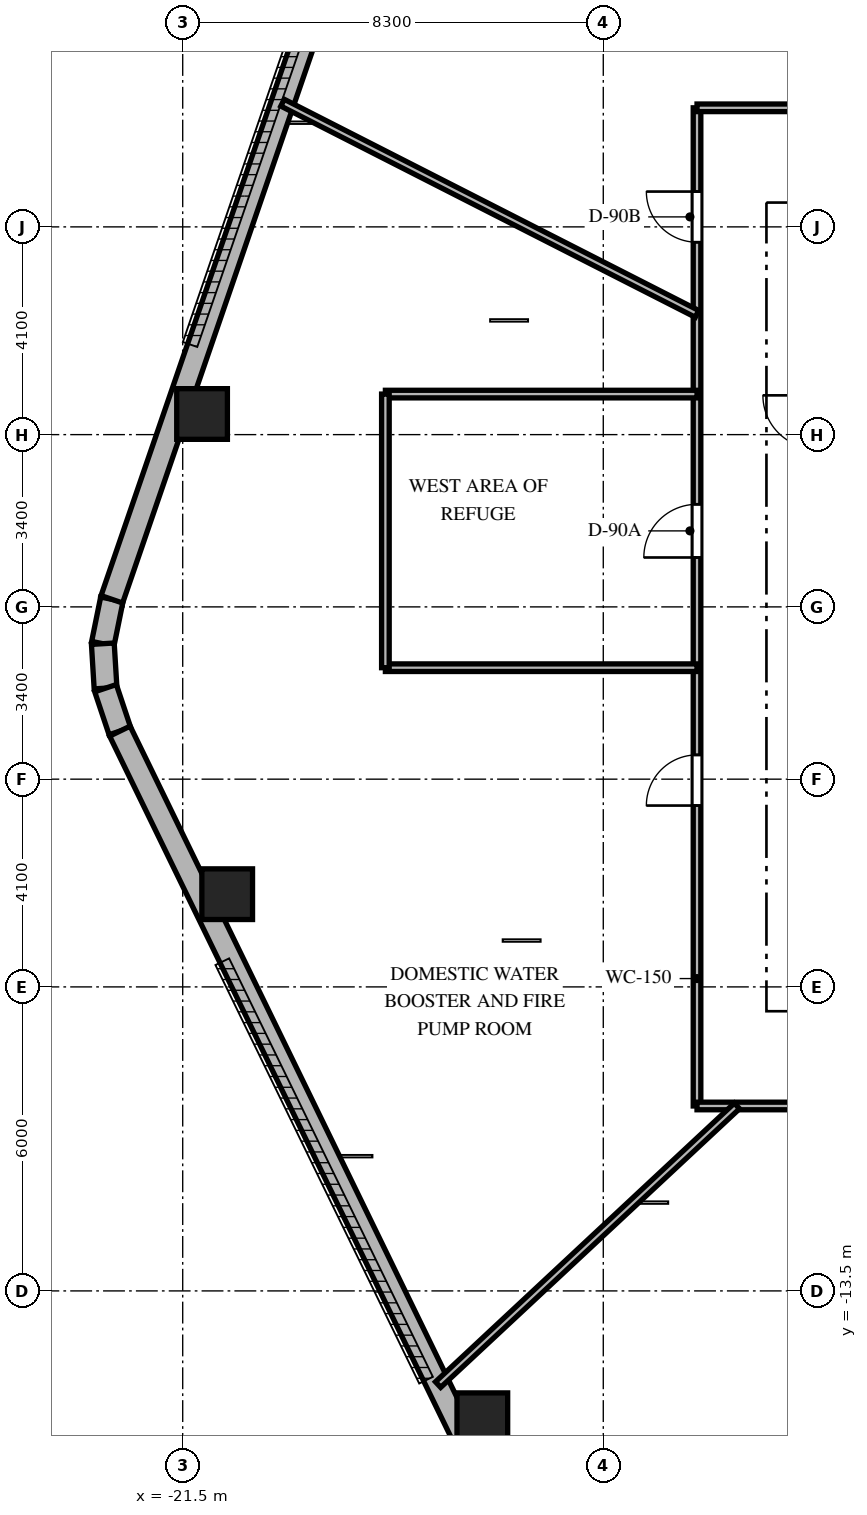
"""IFC4 building model, lengths in metres.
Left out: names, types, materials, properties, quantities, classifications, styles, units other than length and angle.
Written with IfcOpenShell. Run it as: python <this file> out.ifc"""

import sys

from ifc_helpers import new_model, si_unit, direction, frame, frame_2d, origin, origin_2d, place, context, subcontext, project, spatial, rectangle, extrude, element, fill, save


model = new_model("IFC4")
c1 = context("Model", 3, precision=1e-05, world=origin(), true_north=direction((0.0, 1.0)))
c2 = subcontext(c1, "Body", "Model", "MODEL_VIEW")
j1 = project(units=[si_unit("LENGTHUNIT", "METRE"), si_unit("PLANEANGLEUNIT", "RADIAN")], contexts=[c1])
p1 = place(None, origin())
s1 = spatial("IfcSite", under=j1, at=p1, CompositionType="ELEMENT")
p2 = place(p1, origin())
s2 = spatial("IfcBuilding", under=s1, at=p2, CompositionType="ELEMENT")
p3 = place(p2, frame((0.0, 0.0, 255.9)))
s3 = spatial("IfcBuildingStorey", under=s2, at=p3, CompositionType="ELEMENT", Elevation=255.9)
for number, where, z_axis, x_axis in (
    (1, (-21.118, 3.807, 0.0), (0.0, 0.0, 1.0), (1.0, 0.0, 0.0)),
    (2, (-20.622, -5.67, 0.0), (0.0, 0.0, 1.0), (1.0, 0.0, 0.0)),
    (3, (-15.587, -16.013, 0.0), (0.0, 0.0, 1.0), (1.0, 0.0, 0.0)),
):
    element("IfcColumn", number, at=place(p3, frame(where, z_axis=z_axis, x_axis=x_axis)), inside=s3, PredefinedType="COLUMN", context=c2, shape_type="SweptSolid", body=[
        extrude(rectangle(XDim=1.0, YDim=1.0, at=origin_2d()), origin(), (0.0, 0.0, 1.0), 5.4),
    ])
p4 = place(p3, frame((-22.898, 0.15, 0.0), z_axis=(0.0, 0.0, 1.0), x_axis=(-0.199055826889, -0.979988151858, 0.0)))
e4 = element("IfcWall", 4, at=p4, inside=s3, PredefinedType="SOLIDWALL", context=c2, shape_type="SweptSolid", body=[
    extrude(rectangle(XDim=0.894, YDim=0.45, at=frame_2d((0.447, 0.0))), origin(), (0.0, 0.0, 1.0), 5.1),
])
p5 = place(p3, frame((-23.076, -0.727, 0.0), z_axis=(0.0, 0.0, 1.0), x_axis=(0.060805222108, -0.998149650586, 0.0)))
e5 = element("IfcWall", 5, at=p5, inside=s3, PredefinedType="SOLIDWALL", context=c2, shape_type="SweptSolid", body=[
    extrude(rectangle(XDim=0.879, YDim=0.45, at=frame_2d((0.44, 0.0))), origin(), (0.0, 0.0, 1.0), 5.1),
])
p6 = place(p3, frame((-23.023, -1.604, 0.0), z_axis=(0.0, 0.0, 1.0), x_axis=(0.316801227695, -0.948491951537, 0.0)))
e6 = element("IfcWall", 6, at=p6, inside=s3, PredefinedType="SOLIDWALL", context=c2, shape_type="SweptSolid", body=[
    extrude(rectangle(XDim=0.894, YDim=0.45, at=frame_2d((0.447, 0.0))), origin(), (0.0, 0.0, 1.0), 5.1),
])
p7 = place(p3, frame((-16.324, 19.275, 0.0), z_axis=(0.0, 0.0, 1.0), x_axis=(-0.325083142304, -0.945685439557, 0.0)))
e7 = element("IfcWall", 7, at=p7, inside=s3, PredefinedType="SOLIDWALL", context=c2, shape_type="SweptSolid", body=[
    extrude(rectangle(XDim=20.224, YDim=0.45, at=frame_2d((10.112, 0.0))), origin(), (0.0, 0.0, 1.0), 5.1),
])
p8 = place(p3, frame((-22.74, -2.452, 0.0), z_axis=(0.0, 0.0, 1.0), x_axis=(0.437753424814, -0.899095066755, 0.0)))
e8 = element("IfcWall", 8, at=p8, inside=s3, PredefinedType="SOLIDWALL", context=c2, shape_type="SweptSolid", body=[
    extrude(rectangle(XDim=19.137, YDim=0.45, at=frame_2d((9.569, 0.0))), origin(), (0.0, 0.0, 1.0), 5.1),
])
p9 = place(p3, frame((-11.35, -9.85, 0.0), z_axis=(0.0, 0.0, 1.0), x_axis=(0.0, 1.0, 0.0)))
e9 = element("IfcWall", 9, at=p9, inside=s3, PredefinedType="PARTITIONING", context=c2, shape_type="SweptSolid", body=[
    extrude(rectangle(XDim=19.7, YDim=0.15, at=frame_2d((9.85, 0.0))), origin(), (0.0, 0.0, 1.0), 3.29),
])
p10 = place(p9, frame((10.825, 0.0, 0.0)))
e10 = element("IfcOpeningElement", 10, at=p10, cuts=e9, PredefinedType="OPENING", context=c2, shape_type="SweptSolid", body=[
    extrude(rectangle(XDim=1.05, YDim=2.15, at=frame_2d((0.525, 1.075))), frame((0.0, 0.085, 0.0), z_axis=(0.0, -1.0, 0.0), x_axis=(1.0, 0.0, 0.0)), (0.0, 0.0, 1.0), 0.17),
])
p11 = place(p9, frame((17.047, 0.0, 0.0)))
e11 = element("IfcOpeningElement", 11, at=p11, cuts=e9, PredefinedType="OPENING", context=c2, shape_type="SweptSolid", body=[
    extrude(rectangle(XDim=1.0, YDim=2.15, at=frame_2d((0.5, 1.075))), frame((0.0, 0.085, 0.0), z_axis=(0.0, -1.0, 0.0), x_axis=(1.0, 0.0, 0.0)), (0.0, 0.0, 1.0), 0.17),
])
p12 = place(p9, frame((5.929, 0.0, 0.0)))
e12 = element("IfcOpeningElement", 12, at=p12, cuts=e9, PredefinedType="OPENING", context=c2, shape_type="SweptSolid", body=[
    extrude(rectangle(XDim=1.0, YDim=2.15, at=frame_2d((0.5, 1.075))), frame((0.0, 0.085, 0.0), z_axis=(0.0, -1.0, 0.0), x_axis=(1.0, 0.0, 0.0)), (0.0, 0.0, 1.0), 0.17),
])
p13 = place(p3, frame((-11.35, 9.85, 0.0), z_axis=(0.0, 0.0, 1.0), x_axis=(1.0, 0.0, 0.0)))
e13 = element("IfcWall", 13, at=p13, inside=s3, PredefinedType="PARTITIONING", context=c2, shape_type="SweptSolid", body=[
    extrude(rectangle(XDim=22.7, YDim=0.15, at=frame_2d((11.35, 0.0))), origin(), (0.0, 0.0, 1.0), 3.29),
])
p14 = place(p13, frame((17.01, 0.0, 0.0)))
e14 = element("IfcOpeningElement", 14, at=p14, cuts=e13, PredefinedType="OPENING", context=c2, shape_type="SweptSolid", body=[
    extrude(rectangle(XDim=1.0, YDim=2.15, at=frame_2d((0.5, 1.075))), frame((0.0, 0.085, 0.0), z_axis=(0.0, -1.0, 0.0), x_axis=(1.0, 0.0, 0.0)), (0.0, 0.0, 1.0), 0.17),
])
p15 = place(p3, frame((11.35, -9.85, 0.0), z_axis=(0.0, 0.0, 1.0), x_axis=(-1.0, 0.0, 0.0)))
e15 = element("IfcWall", 15, at=p15, inside=s3, PredefinedType="PARTITIONING", context=c2, shape_type="SweptSolid", body=[
    extrude(rectangle(XDim=22.7, YDim=0.15, at=frame_2d((11.35, 0.0))), origin(), (0.0, 0.0, 1.0), 3.29),
])
p16 = place(p15, frame((14.086, 0.0, 0.0)))
e16 = element("IfcOpeningElement", 16, at=p16, cuts=e15, PredefinedType="OPENING", context=c2, shape_type="SweptSolid", body=[
    extrude(rectangle(XDim=1.0, YDim=2.15, at=frame_2d((0.5, 1.075))), frame((0.0, 0.085, 0.0), z_axis=(0.0, -1.0, 0.0), x_axis=(1.0, 0.0, 0.0)), (0.0, 0.0, 1.0), 0.17),
])
p17 = place(p3, frame((-17.5, -1.2, 0.0), z_axis=(0.0, 0.0, 1.0), x_axis=(1.0, 0.0, 0.0)))
e17 = element("IfcWall", 17, at=p17, inside=s3, PredefinedType="PARTITIONING", context=c2, shape_type="SweptSolid", body=[
    extrude(rectangle(XDim=6.15, YDim=0.15, at=frame_2d((3.075, 0.0))), origin(), (0.0, 0.0, 1.0), 4.541),
])
p18 = place(p3, frame((-17.5, 4.2, 0.0), z_axis=(0.0, 0.0, 1.0), x_axis=(1.0, 0.0, 0.0)))
e18 = element("IfcWall", 18, at=p18, inside=s3, PredefinedType="PARTITIONING", context=c2, shape_type="SweptSolid", body=[
    extrude(rectangle(XDim=6.15, YDim=0.15, at=frame_2d((3.075, 0.0))), origin(), (0.0, 0.0, 1.0), 3.29),
])
p19 = place(p3, frame((-17.5, -1.2, 0.0), z_axis=(0.0, 0.0, 1.0), x_axis=(0.0, 1.0, 0.0)))
e19 = element("IfcWall", 19, at=p19, inside=s3, PredefinedType="PARTITIONING", context=c2, shape_type="SweptSolid", body=[
    extrude(rectangle(XDim=5.4, YDim=0.15, at=frame_2d((2.7, 0.0))), origin(), (0.0, 0.0, 1.0), 3.29),
])
p20 = place(p3, frame((-11.35, 5.783, 0.0), z_axis=(0.0, 0.0, 1.0), x_axis=(-0.891007832475, 0.453987932074, 0.0)))
e20 = element("IfcWall", 20, at=p20, inside=s3, PredefinedType="PARTITIONING", context=c2, shape_type="SweptSolid", body=[
    extrude(rectangle(XDim=9.18, YDim=0.15, at=frame_2d((4.59, 0.0))), origin(), (0.0, 0.0, 1.0), 3.29),
])
p21 = place(p3, frame((-10.563, -9.85, 0.0), z_axis=(0.0, 0.0, 1.0), x_axis=(-0.731351201167, -0.682001041459, 0.0)))
e21 = element("IfcWall", 21, at=p21, inside=s3, PredefinedType="PARTITIONING", context=c2, shape_type="SweptSolid", body=[
    extrude(rectangle(XDim=8.064, YDim=0.15, at=frame_2d((4.032, 0.0))), origin(), (0.0, 0.0, 1.0), 3.29),
])
p22 = place(p10, origin())
e22 = element("IfcDoor", 22, at=p22, inside=s3, OperationType="SINGLE_SWING_LEFT", PredefinedType="DOOR", context=c2, shape_type="SweptSolid", body=[
    extrude(rectangle(XDim=1.05, YDim=2.15, at=frame_2d((0.525, 1.075))), frame((0.0, 0.025, 0.0), z_axis=(0.0, -1.0, 0.0), x_axis=(1.0, 0.0, 0.0)), (0.0, 0.0, 1.0), 0.05),
])
fill(e10, e22)
p23 = place(p11, origin())
e23 = element("IfcDoor", 23, at=p23, inside=s3, OperationType="SINGLE_SWING_RIGHT", PredefinedType="DOOR", context=c2, shape_type="SweptSolid", body=[
    extrude(rectangle(XDim=1.0, YDim=2.15, at=frame_2d((0.5, 1.075))), frame((0.0, 0.025, 0.0), z_axis=(0.0, -1.0, 0.0), x_axis=(1.0, 0.0, 0.0)), (0.0, 0.0, 1.0), 0.05),
])
fill(e11, e23)
p24 = place(p12, origin())
e24 = element("IfcDoor", 24, at=p24, inside=s3, OperationType="SINGLE_SWING_LEFT", PredefinedType="DOOR", context=c2, shape_type="SweptSolid", body=[
    extrude(rectangle(XDim=1.0, YDim=2.15, at=frame_2d((0.5, 1.075))), frame((0.0, 0.025, 0.0), z_axis=(0.0, -1.0, 0.0), x_axis=(1.0, 0.0, 0.0)), (0.0, 0.0, 1.0), 0.05),
])
fill(e12, e24)
save(model, sys.argv[1])
